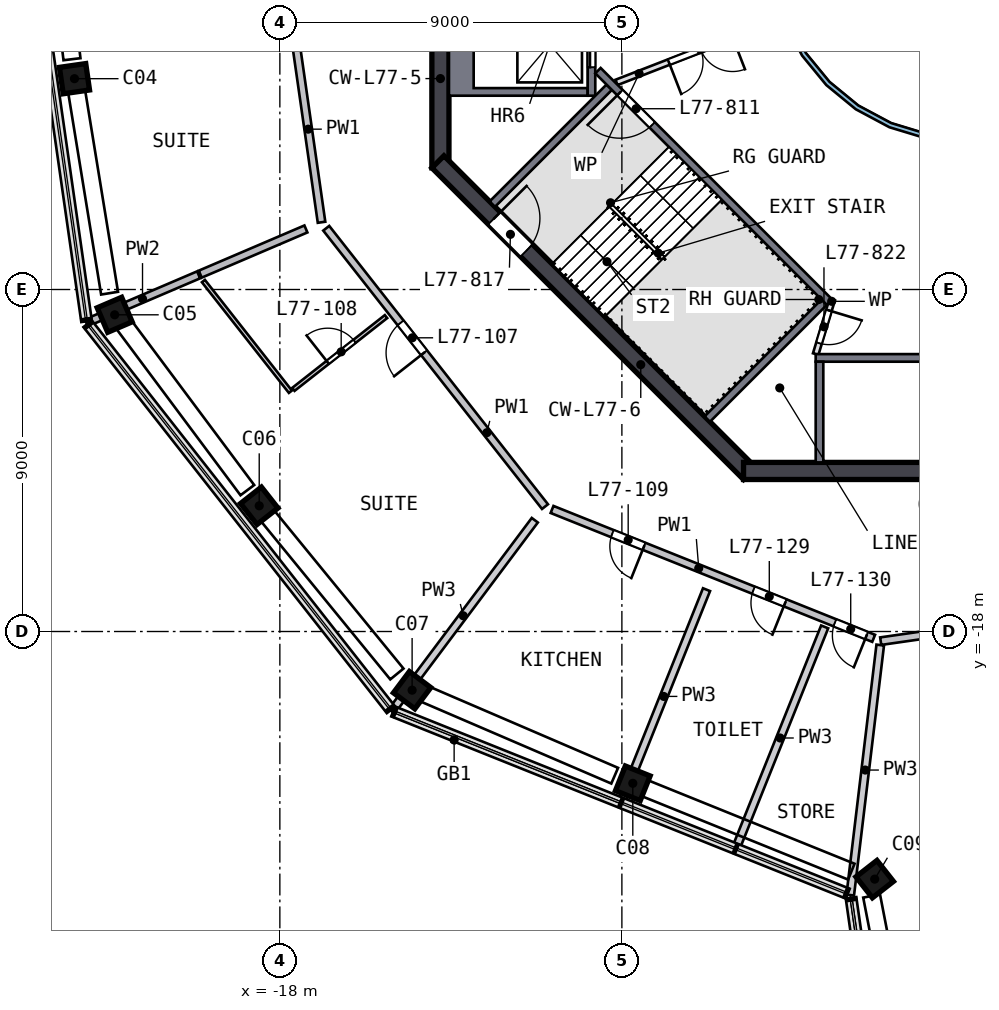
"""IFC4 building model, lengths in metres.
Left out: names, types, materials, properties, quantities, classifications, styles, units other than length and angle.
Written with IfcOpenShell. Run it as: python <this file> out.ifc"""

import sys

from ifc_helpers import new_model, si_unit, direction, frame, frame_2d, origin, origin_2d, place, context, subcontext, project, spatial, polyline, rectangle, outline, extrude, element, fill, save


model = new_model("IFC4")
c1 = context("Model", 3, precision=1e-05, world=origin(), true_north=direction((0.0, 1.0)))
c2 = subcontext(c1, "Body", "Model", "MODEL_VIEW")
j1 = project(units=[si_unit("LENGTHUNIT", "METRE"), si_unit("PLANEANGLEUNIT", "RADIAN")], contexts=[c1])
p1 = place(None, origin())
s1 = spatial("IfcSite", under=j1, at=p1, CompositionType="ELEMENT")
p2 = place(p1, origin())
s2 = spatial("IfcBuilding", under=s1, at=p2, CompositionType="ELEMENT")
p3 = place(p2, frame((0.0, 0.0, 310.0)))
s3 = spatial("IfcBuildingStorey", under=s2, at=p3, CompositionType="ELEMENT", Elevation=310.0)
p4 = place(p3, frame((-23.419, -3.358, 0.0), z_axis=(0.011851144, -0.078143481, 0.99687168), x_axis=(0.141161179, -0.986826788, -0.079034246)))
e1 = element("IfcColumn", 1, at=p4, inside=s3, PredefinedType="COLUMN", context=c2, shape_type="SweptSolid", body=[
    extrude(rectangle(XDim=0.7, YDim=0.7, at=origin_2d()), origin(), (0.0, 0.0, 1.0), 4.615),
])
p5 = place(p3, frame((-22.386, -9.576, 0.0), z_axis=(0.032584708, -0.074479333, 0.996690055), x_axis=(-0.391777358, 0.916461693, 0.08129248)))
e2 = element("IfcColumn", 2, at=p5, inside=s3, PredefinedType="COLUMN", context=c2, shape_type="SweptSolid", body=[
    extrude(rectangle(XDim=0.7, YDim=0.7, at=origin_2d()), origin(), (0.0, 0.0, 1.0), 4.615),
])
p6 = place(p3, frame((-18.602, -14.617, 0.0), z_axis=(0.049362085, -0.061742286, 0.996870741), x_axis=(0.615910303, -0.783840682, -0.079046088)))
e3 = element("IfcColumn", 3, at=p6, inside=s3, PredefinedType="COLUMN", context=c2, shape_type="SweptSolid", body=[
    extrude(rectangle(XDim=0.7, YDim=0.7, at=origin_2d()), origin(), (0.0, 0.0, 1.0), 4.615),
])
p7 = place(p3, frame((-14.599, -19.486, 0.0), z_axis=(0.065486741, -0.048189355, 0.996689156), x_axis=(-0.797754975, 0.597475305, 0.081303506)))
e4 = element("IfcColumn", 4, at=p7, inside=s3, PredefinedType="COLUMN", context=c2, shape_type="SweptSolid", body=[
    extrude(rectangle(XDim=0.7, YDim=0.7, at=origin_2d()), origin(), (0.0, 0.0, 1.0), 4.615),
])
p8 = place(p3, frame((-8.801, -21.96, 0.0), z_axis=(0.07359358, -0.028781386, 0.996872919), x_axis=(0.925306036, -0.370897286, -0.079018619)))
e5 = element("IfcColumn", 5, at=p8, inside=s3, PredefinedType="COLUMN", context=c2, shape_type="SweptSolid", body=[
    extrude(rectangle(XDim=0.7, YDim=0.7, at=origin_2d()), origin(), (0.0, 0.0, 1.0), 4.615),
])
p9 = place(p3, frame((-2.446, -24.507, 0.0), z_axis=(0.081931271, -0.007457914, 0.996610077), x_axis=(-0.614475431, 0.786917055, 0.056404721)))
e6 = element("IfcColumn", 6, at=p9, inside=s3, PredefinedType="COLUMN", context=c2, shape_type="SweptSolid", body=[
    extrude(rectangle(XDim=0.7, YDim=0.7, at=origin_2d()), origin(), (0.0, 0.0, 1.0), 4.616),
])
p10 = place(p3, frame((-13.775, 5.799, 0.0), z_axis=(0.0, 0.0, 1.0), x_axis=(0.0, -1.0, 0.0)))
e7 = element("IfcWall", 7, at=p10, inside=s3, PredefinedType="SHEAR", context=c2, shape_type="SweptSolid", body=[
    extrude(rectangle(XDim=11.598, YDim=0.45, at=frame_2d((5.799, 0.0))), origin(), (0.0, 0.0, 1.0), 5.0),
])
p11 = place(p10, frame((4.899, 0.0, 0.0)))
e8 = element("IfcOpeningElement", 8, at=p11, cuts=e7, PredefinedType="OPENING", context=c2, shape_type="SweptSolid", body=[
    extrude(rectangle(XDim=1.8, YDim=2.1, at=frame_2d((0.9, 1.05))), frame((0.0, 0.235, 0.0), z_axis=(0.0, -1.0, 0.0), x_axis=(1.0, 0.0, 0.0)), (0.0, 0.0, 1.0), 0.47),
])
p12 = place(p3, frame((-13.841, -5.64, 0.0), z_axis=(0.0, 0.0, 1.0), x_axis=(0.707106781, -0.707106781, 0.0)))
e9 = element("IfcWall", 9, at=p12, inside=s3, PredefinedType="SHEAR", context=c2, shape_type="SweptSolid", body=[
    extrude(rectangle(XDim=11.598, YDim=0.45, at=frame_2d((5.799, 0.0))), origin(), (0.0, 0.0, 1.0), 5.0),
])
p13 = place(p12, frame((2.099, 0.0, 0.0)))
e10 = element("IfcOpeningElement", 10, at=p13, cuts=e9, PredefinedType="OPENING", context=c2, shape_type="SweptSolid", body=[
    extrude(rectangle(XDim=1.2, YDim=2.1, at=frame_2d((0.6, 1.05))), frame((0.0, 0.235, 0.0), z_axis=(0.0, -1.0, 0.0), x_axis=(1.0, 0.0, 0.0)), (0.0, 0.0, 1.0), 0.47),
])
p14 = place(p3, frame((-5.799, -13.775, 0.0), z_axis=(0.0, 0.0, 1.0), x_axis=(1.0, 0.0, 0.0)))
e11 = element("IfcWall", 11, at=p14, inside=s3, PredefinedType="SHEAR", context=c2, shape_type="SweptSolid", body=[
    extrude(rectangle(XDim=11.598, YDim=0.45, at=frame_2d((5.799, 0.0))), origin(), (0.0, 0.0, 1.0), 5.0),
])
p15 = place(p3, origin())
e12 = element("IfcWall", 12, at=p15, inside=s3, PredefinedType="SOLIDWALL", context=c2, shape_type="SweptSolid", body=[
    extrude(outline(polyline([(-13.55, -3.9), (-13.55, -1.2), (-9.9, -1.2), (-9.9, -1.4), (-12.9, -1.4), (-12.9, -3.7), (-9.9, -3.7), (-9.9, -3.9), (-13.55, -3.9)])), origin(), (0.0, 0.0, 1.0), 4.6),
])
p16 = place(p3, frame((-9.8, -1.2, 0.0), z_axis=(0.0, 0.0, 1.0), x_axis=(0.0, -1.0, 0.0)))
e13 = element("IfcWall", 13, at=p16, inside=s3, PredefinedType="SOLIDWALL", context=c2, shape_type="SweptSolid", body=[
    extrude(rectangle(XDim=2.7, YDim=0.2, at=frame_2d((1.35, 0.0))), origin(), (0.0, 0.0, 1.0), 4.6),
])
p17 = place(p16, frame((0.75, 0.0, 0.0)))
e14 = element("IfcOpeningElement", 14, at=p17, cuts=e13, PredefinedType="OPENING", context=c2, shape_type="SweptSolid", body=[
    extrude(rectangle(XDim=1.2, YDim=2.1, at=frame_2d((0.6, 1.05))), frame((0.0, 0.11, 0.0), z_axis=(0.0, -1.0, 0.0), x_axis=(1.0, 0.0, 0.0)), (0.0, 0.0, 1.0), 0.22),
])
p18 = place(p3, frame((-3.9, -10.8, 0.0), z_axis=(0.0, 0.0, 1.0), x_axis=(1.0, 0.0, 0.0)))
e15 = element("IfcWall", 15, at=p18, inside=s3, PredefinedType="SOLIDWALL", context=c2, shape_type="SweptSolid", body=[
    extrude(rectangle(XDim=7.8, YDim=0.2, at=frame_2d((3.9, 0.0))), origin(), (0.0, 0.0, 1.0), 4.6),
])
p19 = place(p18, frame((3.45, 0.0, 0.0)))
e16 = element("IfcOpeningElement", 16, at=p19, cuts=e15, PredefinedType="OPENING", context=c2, shape_type="SweptSolid", body=[
    extrude(rectangle(XDim=0.9, YDim=2.1, at=frame_2d((0.45, 1.05))), frame((0.0, 0.11, 0.0), z_axis=(0.0, -1.0, 0.0), x_axis=(1.0, 0.0, 0.0)), (0.0, 0.0, 1.0), 0.22),
])
p20 = place(p3, frame((-3.8, -10.9, 0.0), z_axis=(0.0, 0.0, 1.0), x_axis=(0.0, -1.0, 0.0)))
e17 = element("IfcWall", 17, at=p20, inside=s3, PredefinedType="SOLIDWALL", context=c2, shape_type="SweptSolid", body=[
    extrude(rectangle(XDim=2.65, YDim=0.2, at=frame_2d((1.325, 0.0))), origin(), (0.0, 0.0, 1.0), 4.6),
])
p21 = place(p3, frame((-3.535, -9.334, 0.0), z_axis=(0.0, 0.0, 1.0), x_axis=(-0.707120946, 0.707092617, 0.0)))
e18 = element("IfcWall", 18, at=p21, inside=s3, PredefinedType="SOLIDWALL", context=c2, shape_type="SweptSolid", body=[
    extrude(rectangle(XDim=8.618, YDim=0.2, at=frame_2d((4.309, 0.0))), origin(), (0.0, 0.0, 1.0), 4.6),
])
p22 = place(p21, frame((6.6, 0.0, 0.0)))
e19 = element("IfcOpeningElement", 19, at=p22, cuts=e18, PredefinedType="OPENING", context=c2, shape_type="SweptSolid", body=[
    extrude(rectangle(XDim=1.2, YDim=2.1, at=frame_2d((0.6, 1.05))), frame((0.0, 0.11, 0.0), z_axis=(0.0, -1.0, 0.0), x_axis=(1.0, 0.0, 0.0)), (0.0, 0.0, 1.0), 0.22),
])
for number, where, z_axis, x_axis in (
    (20, (-9.334, -3.677, 0.0), (0.0, 0.0, 1.0), (-0.707, -0.707, 0.0)),
    (21, (-3.677, -9.334, 0.0), (0.0, 0.0, 1.0), (-0.707, -0.707, 0.0)),
):
    element("IfcWall", number, at=place(p3, frame(where, z_axis=z_axis, x_axis=x_axis)), inside=s3, PredefinedType="SOLIDWALL", context=c2, shape_type="SweptSolid", body=[
        extrude(rectangle(XDim=4.35, YDim=0.2, at=frame_2d((2.175, 0.0))), origin(), (0.0, 0.0, 1.0), 4.6),
    ])
p23 = place(p3, frame((-3.465, -9.263, 0.0), z_axis=(0.0, 0.0, 1.0), x_axis=(-0.289808785, -0.957084567, 0.0)))
e22 = element("IfcWall", 22, at=p23, inside=s3, PredefinedType="PARTITIONING", context=c2, shape_type="SweptSolid", body=[
    extrude(rectangle(XDim=1.501, YDim=0.15, at=frame_2d((0.75, 0.0))), origin(), (0.0, 0.0, 1.0), 4.6),
])
p24 = place(p23, frame((0.301, 0.0, 0.0)))
e23 = element("IfcOpeningElement", 23, at=p24, cuts=e22, PredefinedType="OPENING", context=c2, shape_type="SweptSolid", body=[
    extrude(rectangle(XDim=0.9, YDim=2.1, at=frame_2d((0.45, 1.05))), frame((0.0, 0.085, 0.0), z_axis=(0.0, -1.0, 0.0), x_axis=(1.0, 0.0, 0.0)), (0.0, 0.0, 1.0), 0.17),
])
p25 = place(p3, frame((-4.782, -1.857, 0.0), z_axis=(0.0, 0.0, 1.0), x_axis=(-0.932167228, -0.36202798, 0.0)))
e24 = element("IfcWall", 24, at=p25, inside=s3, PredefinedType="PARTITIONING", context=c2, shape_type="SweptSolid", body=[
    extrude(rectangle(XDim=4.676, YDim=0.15, at=frame_2d((2.338, 0.0))), origin(), (0.0, 0.0, 1.0), 4.6),
])
p26 = place(p25, frame((1.4, 0.0, 0.0)))
e25 = element("IfcOpeningElement", 25, at=p26, cuts=e24, PredefinedType="OPENING", context=c2, shape_type="SweptSolid", body=[
    extrude(rectangle(XDim=1.8, YDim=2.1, at=frame_2d((0.9, 1.05))), frame((0.0, 0.085, 0.0), z_axis=(0.0, -1.0, 0.0), x_axis=(1.0, 0.0, 0.0)), (0.0, 0.0, 1.0), 0.17),
])
p27 = place(p3, origin())
e26 = element("IfcWall", 26, at=p27, inside=s3, PredefinedType="SOLIDWALL", context=c2, shape_type="SweptSolid", body=[
    extrude(outline(polyline([(5.021, -0.999), (4.73, -1.959), (4.257, -2.844), (3.62, -3.62), (2.844, -4.257), (1.959, -4.73), (0.999, -5.021), (0.0, -5.12), (-0.999, -5.021), (-1.959, -4.73), (-2.844, -4.257), (-3.62, -3.62), (-4.257, -2.844), (-4.73, -1.959), (-5.021, -0.999), (-5.12, 0.0), (-5.021, 0.999), (-4.73, 1.959), (-4.257, 2.844), (-3.62, 3.62), (-2.844, 4.257), (-1.959, 4.73), (-0.999, 5.021), (0.0, 5.12), (0.999, 5.021), (1.959, 4.73), (2.844, 4.257), (3.62, 3.62), (4.257, 2.844), (4.73, 1.959), (5.021, 0.999), (5.12, 0.0), (5.021, -0.999)]), holes=[polyline([(4.904, 0.976), (4.619, 1.913), (4.157, 2.778), (3.535, 3.535), (2.778, 4.157), (1.913, 4.619), (0.976, 4.904), (0.0, 5.0), (-0.976, 4.904), (-1.913, 4.619), (-2.778, 4.157), (-3.535, 3.535), (-4.157, 2.778), (-4.619, 1.913), (-4.904, 0.976), (-5.0, 0.0), (-4.904, -0.976), (-4.619, -1.913), (-4.157, -2.778), (-3.535, -3.535), (-2.778, -4.157), (-1.913, -4.619), (-0.976, -4.904), (0.0, -5.0), (0.976, -4.904), (1.913, -4.619), (2.778, -4.157), (3.535, -3.535), (4.157, -2.778), (4.619, -1.913), (4.904, -0.976), (5.0, 0.0), (4.904, 0.976)])]), origin(), (0.0, 0.0, 1.0), 4.6),
])
p28 = place(p3, frame((-16.903, -7.231, 0.0), z_axis=(0.0, 0.0, 1.0), x_axis=(-0.141927623, 0.989877038, 0.0)))
e27 = element("IfcWall", 27, at=p28, inside=s3, PredefinedType="SOLIDWALL", context=c2, shape_type="SweptSolid", body=[
    extrude(rectangle(XDim=9.316, YDim=0.2, at=frame_2d((4.658, 0.0))), origin(), (0.0, 0.0, 1.0), 4.6),
])
p29 = place(p28, frame((5.15, 0.0, 0.0)))
e28 = element("IfcOpeningElement", 28, at=p29, cuts=e27, PredefinedType="OPENING", context=c2, shape_type="SweptSolid", body=[
    extrude(rectangle(XDim=1.0, YDim=2.1, at=frame_2d((0.5, 1.05))), frame((0.0, 0.11, 0.0), z_axis=(0.0, -1.0, 0.0), x_axis=(1.0, 0.0, 0.0)), (0.0, 0.0, 1.0), 0.22),
])
p30 = place(p3, frame((-11.023, -14.713, 0.0), z_axis=(0.0, 0.0, 1.0), x_axis=(-0.617864372, 0.786284693, 0.0)))
e29 = element("IfcWall", 29, at=p30, inside=s3, PredefinedType="SOLIDWALL", context=c2, shape_type="SweptSolid", body=[
    extrude(rectangle(XDim=9.316, YDim=0.2, at=frame_2d((4.658, 0.0))), origin(), (0.0, 0.0, 1.0), 4.6),
])
p31 = place(p30, frame((5.15, 0.0, 0.0)))
e30 = element("IfcOpeningElement", 30, at=p31, cuts=e29, PredefinedType="OPENING", context=c2, shape_type="SweptSolid", body=[
    extrude(rectangle(XDim=1.0, YDim=2.1, at=frame_2d((0.5, 1.05))), frame((0.0, 0.11, 0.0), z_axis=(0.0, -1.0, 0.0), x_axis=(1.0, 0.0, 0.0)), (0.0, 0.0, 1.0), 0.22),
])
p32 = place(p3, frame((-2.375, -18.179, 0.0), z_axis=(0.0, 0.0, 1.0), x_axis=(-0.928230848, 0.372004694, 0.0)))
e31 = element("IfcWall", 31, at=p32, inside=s3, PredefinedType="SOLIDWALL", context=c2, shape_type="SweptSolid", body=[
    extrude(rectangle(XDim=9.116, YDim=0.2, at=frame_2d((4.558, 0.0))), origin(), (0.0, 0.0, 1.0), 4.6),
])
p33 = place(p32, frame((6.508, 0.0, 0.0)))
e32 = element("IfcOpeningElement", 32, at=p33, cuts=e31, PredefinedType="OPENING", context=c2, shape_type="SweptSolid", body=[
    extrude(rectangle(XDim=0.9, YDim=2.1, at=frame_2d((0.45, 1.05))), frame((0.0, 0.11, 0.0), z_axis=(0.0, -1.0, 0.0), x_axis=(1.0, 0.0, 0.0)), (0.0, 0.0, 1.0), 0.22),
])
p34 = place(p32, frame((2.508, 0.0, 0.0)))
e33 = element("IfcOpeningElement", 33, at=p34, cuts=e31, PredefinedType="OPENING", context=c2, shape_type="SweptSolid", body=[
    extrude(rectangle(XDim=0.9, YDim=2.1, at=frame_2d((0.45, 1.05))), frame((0.0, 0.11, 0.0), z_axis=(0.0, -1.0, 0.0), x_axis=(1.0, 0.0, 0.0)), (0.0, 0.0, 1.0), 0.22),
])
p35 = place(p32, frame((0.2, 0.0, 0.0)))
e34 = element("IfcOpeningElement", 34, at=p35, cuts=e31, PredefinedType="OPENING", context=c2, shape_type="SweptSolid", body=[
    extrude(rectangle(XDim=0.9, YDim=2.1, at=frame_2d((0.45, 1.05))), frame((0.0, 0.11, 0.0), z_axis=(0.0, -1.0, 0.0), x_axis=(1.0, 0.0, 0.0)), (0.0, 0.0, 1.0), 0.22),
])
p36 = place(p3, frame((7.231, -16.903, 0.0), z_axis=(0.0, 0.0, 1.0), x_axis=(-0.989874961, -0.141942107, 0.0)))
e35 = element("IfcWall", 35, at=p36, inside=s3, PredefinedType="SOLIDWALL", context=c2, shape_type="SweptSolid", body=[
    extrude(rectangle(XDim=9.517, YDim=0.2, at=frame_2d((4.758, 0.0))), origin(), (0.0, 0.0, 1.0), 4.6),
])
p37 = place(p36, frame((3.882, 0.0, 0.0)))
e36 = element("IfcOpeningElement", 36, at=p37, cuts=e35, PredefinedType="OPENING", context=c2, shape_type="SweptSolid", body=[
    extrude(rectangle(XDim=1.8, YDim=2.1, at=frame_2d((0.9, 1.05))), frame((0.0, 0.11, 0.0), z_axis=(0.0, -1.0, 0.0), x_axis=(1.0, 0.0, 0.0)), (0.0, 0.0, 1.0), 0.22),
])
p38 = place(p3, frame((-20.137, -8.614, 0.0), z_axis=(0.0, 0.0, 1.0), x_axis=(-0.919423988, -0.39326776, 0.0)))
e37 = element("IfcWall", 37, at=p38, inside=s3, PredefinedType="SOLIDWALL", context=c2, shape_type="SweptSolid", body=[
    extrude(rectangle(XDim=3.211, YDim=0.2, at=frame_2d((1.606, 0.0))), origin(), (0.0, 0.0, 1.0), 4.6),
])
p39 = place(p3, frame((-17.314, -7.406, 0.0), z_axis=(0.0, 0.0, 1.0), x_axis=(-0.919391183, -0.393344446, 0.0)))
e38 = element("IfcWall", 38, at=p39, inside=s3, PredefinedType="SOLIDWALL", context=c2, shape_type="SweptSolid", body=[
    extrude(rectangle(XDim=3.025, YDim=0.2, at=frame_2d((1.512, 0.0))), origin(), (0.0, 0.0, 1.0), 4.6),
])
p40 = place(p3, frame((-17.723, -11.69, 0.0), z_axis=(0.0, 0.0, 1.0), x_axis=(-0.617871038, 0.786279455, 0.0)))
e39 = element("IfcWall", 39, at=p40, inside=s3, PredefinedType="PARTITIONING", context=c2, shape_type="SweptSolid", body=[
    extrude(rectangle(XDim=3.704, YDim=0.1, at=frame_2d((1.852, 0.0))), origin(), (0.0, 0.0, 1.0), 4.6),
])
p41 = place(p3, frame((-17.644, -11.628, 0.0), z_axis=(0.0, 0.0, 1.0), x_axis=(0.786301941, 0.617842421, 0.0)))
e40 = element("IfcWall", 40, at=p41, inside=s3, PredefinedType="PARTITIONING", context=c2, shape_type="SweptSolid", body=[
    extrude(rectangle(XDim=3.1, YDim=0.1, at=frame_2d((1.55, 0.0))), origin(), (0.0, 0.0, 1.0), 4.6),
])
p42 = place(p41, frame((1.15, 0.0, 0.0)))
e41 = element("IfcOpeningElement", 41, at=p42, cuts=e40, PredefinedType="OPENING", context=c2, shape_type="SweptSolid", body=[
    extrude(rectangle(XDim=0.9, YDim=2.1, at=frame_2d((0.45, 1.05))), frame((0.0, 0.06, 0.0), z_axis=(0.0, -1.0, 0.0), x_axis=(1.0, 0.0, 0.0)), (0.0, 0.0, 1.0), 0.12),
])
p43 = place(p3, frame((-15.058, -20.099, 0.0), z_axis=(0.0, 0.0, 1.0), x_axis=(0.599558411, 0.800331001, 0.0)))
e42 = element("IfcWall", 42, at=p43, inside=s3, PredefinedType="SOLIDWALL", context=c2, shape_type="SweptSolid", body=[
    extrude(rectangle(XDim=6.282, YDim=0.2, at=frame_2d((3.141, 0.0))), origin(), (0.0, 0.0, 1.0), 4.6),
])
p44 = place(p3, frame((-6.773, -16.899, 0.0), z_axis=(0.0, 0.0, 1.0), x_axis=(-0.372023456, -0.928223329, 0.0)))
e43 = element("IfcWall", 43, at=p44, inside=s3, PredefinedType="SOLIDWALL", context=c2, shape_type="SweptSolid", body=[
    extrude(rectangle(XDim=6.052, YDim=0.2, at=frame_2d((3.026, 0.0))), origin(), (0.0, 0.0, 1.0), 4.6),
])
p45 = place(p3, frame((-3.664, -17.878, 0.0), z_axis=(0.0, 0.0, 1.0), x_axis=(-0.37201864, -0.928225259, 0.0)))
e44 = element("IfcWall", 44, at=p45, inside=s3, PredefinedType="SOLIDWALL", context=c2, shape_type="SweptSolid", body=[
    extrude(rectangle(XDim=6.3, YDim=0.2, at=frame_2d((3.15, 0.0))), origin(), (0.0, 0.0, 1.0), 4.6),
])
p46 = place(p3, frame((-2.991, -24.935, 0.0), z_axis=(0.0, 0.0, 1.0), x_axis=(0.119090008, 0.992883462, 0.0)))
e45 = element("IfcWall", 45, at=p46, inside=s3, PredefinedType="SOLIDWALL", context=c2, shape_type="SweptSolid", body=[
    extrude(rectangle(XDim=6.626, YDim=0.2, at=frame_2d((3.313, 0.0))), origin(), (0.0, 0.0, 1.0), 4.6),
])
p47 = place(p17, origin())
e46 = element("IfcDoor", 46, at=p47, inside=s3, OperationType="DOUBLE_DOOR_SLIDING", PredefinedType="DOOR", context=c2, shape_type="SweptSolid", body=[
    extrude(rectangle(XDim=1.2, YDim=2.1, at=frame_2d((0.6, 1.05))), frame((0.0, 0.025, 0.0), z_axis=(0.0, -1.0, 0.0), x_axis=(1.0, 0.0, 0.0)), (0.0, 0.0, 1.0), 0.05),
])
fill(e14, e46)
p48 = place(p22, origin())
e47 = element("IfcDoor", 47, at=p48, inside=s3, OperationType="SINGLE_SWING_RIGHT", PredefinedType="DOOR", context=c2, shape_type="SweptSolid", body=[
    extrude(rectangle(XDim=1.2, YDim=2.1, at=frame_2d((0.6, 1.05))), frame((0.0, 0.025, 0.0), z_axis=(0.0, -1.0, 0.0), x_axis=(1.0, 0.0, 0.0)), (0.0, 0.0, 1.0), 0.05),
])
fill(e19, e47)
p49 = place(p13, origin())
e48 = element("IfcDoor", 48, at=p49, inside=s3, OperationType="SINGLE_SWING_LEFT", PredefinedType="DOOR", context=c2, shape_type="SweptSolid", body=[
    extrude(rectangle(XDim=1.2, YDim=2.1, at=frame_2d((0.6, 1.05))), frame((0.0, 0.025, 0.0), z_axis=(0.0, -1.0, 0.0), x_axis=(1.0, 0.0, 0.0)), (0.0, 0.0, 1.0), 0.05),
])
fill(e10, e48)
p50 = place(p24, origin())
e49 = element("IfcDoor", 49, at=p50, inside=s3, OperationType="SINGLE_SWING_LEFT", PredefinedType="DOOR", context=c2, shape_type="SweptSolid", body=[
    extrude(rectangle(XDim=0.9, YDim=2.1, at=frame_2d((0.45, 1.05))), frame((0.0, 0.025, 0.0), z_axis=(0.0, -1.0, 0.0), x_axis=(1.0, 0.0, 0.0)), (0.0, 0.0, 1.0), 0.05),
])
fill(e23, e49)
p51 = place(p26, origin())
e50 = element("IfcDoor", 50, at=p51, inside=s3, OperationType="DOUBLE_DOOR_SINGLE_SWING", PredefinedType="DOOR", context=c2, shape_type="SweptSolid", body=[
    extrude(rectangle(XDim=1.8, YDim=2.1, at=frame_2d((0.9, 1.05))), frame((0.0, 0.025, 0.0), z_axis=(0.0, -1.0, 0.0), x_axis=(1.0, 0.0, 0.0)), (0.0, 0.0, 1.0), 0.05),
])
fill(e25, e50)
p52 = place(p31, origin())
e51 = element("IfcDoor", 51, at=p52, inside=s3, OperationType="SINGLE_SWING_LEFT", PredefinedType="DOOR", context=c2, shape_type="SweptSolid", body=[
    extrude(rectangle(XDim=1.0, YDim=2.1, at=frame_2d((0.5, 1.05))), frame((0.0, 0.025, 0.0), z_axis=(0.0, -1.0, 0.0), x_axis=(1.0, 0.0, 0.0)), (0.0, 0.0, 1.0), 0.05),
])
fill(e30, e51)
p53 = place(p42, origin())
e52 = element("IfcDoor", 52, at=p53, inside=s3, OperationType="SINGLE_SWING_LEFT", PredefinedType="DOOR", context=c2, shape_type="SweptSolid", body=[
    extrude(rectangle(XDim=0.9, YDim=2.1, at=frame_2d((0.45, 1.05))), frame((0.0, 0.025, 0.0), z_axis=(0.0, -1.0, 0.0), x_axis=(1.0, 0.0, 0.0)), (0.0, 0.0, 1.0), 0.05),
])
fill(e41, e52)
p54 = place(p33, origin())
e53 = element("IfcDoor", 53, at=p54, inside=s3, OperationType="SINGLE_SWING_LEFT", PredefinedType="DOOR", context=c2, shape_type="SweptSolid", body=[
    extrude(rectangle(XDim=0.9, YDim=2.1, at=frame_2d((0.45, 1.05))), frame((0.0, 0.025, 0.0), z_axis=(0.0, -1.0, 0.0), x_axis=(1.0, 0.0, 0.0)), (0.0, 0.0, 1.0), 0.05),
])
fill(e32, e53)
p55 = place(p34, origin())
e54 = element("IfcDoor", 54, at=p55, inside=s3, OperationType="SINGLE_SWING_LEFT", PredefinedType="DOOR", context=c2, shape_type="SweptSolid", body=[
    extrude(rectangle(XDim=0.9, YDim=2.1, at=frame_2d((0.45, 1.05))), frame((0.0, 0.025, 0.0), z_axis=(0.0, -1.0, 0.0), x_axis=(1.0, 0.0, 0.0)), (0.0, 0.0, 1.0), 0.05),
])
fill(e33, e54)
p56 = place(p35, origin())
e55 = element("IfcDoor", 55, at=p56, inside=s3, OperationType="SINGLE_SWING_LEFT", PredefinedType="DOOR", context=c2, shape_type="SweptSolid", body=[
    extrude(rectangle(XDim=0.9, YDim=2.1, at=frame_2d((0.45, 1.05))), frame((0.0, 0.025, 0.0), z_axis=(0.0, -1.0, 0.0), x_axis=(1.0, 0.0, 0.0)), (0.0, 0.0, 1.0), 0.05),
])
fill(e34, e55)
save(model, sys.argv[1])
